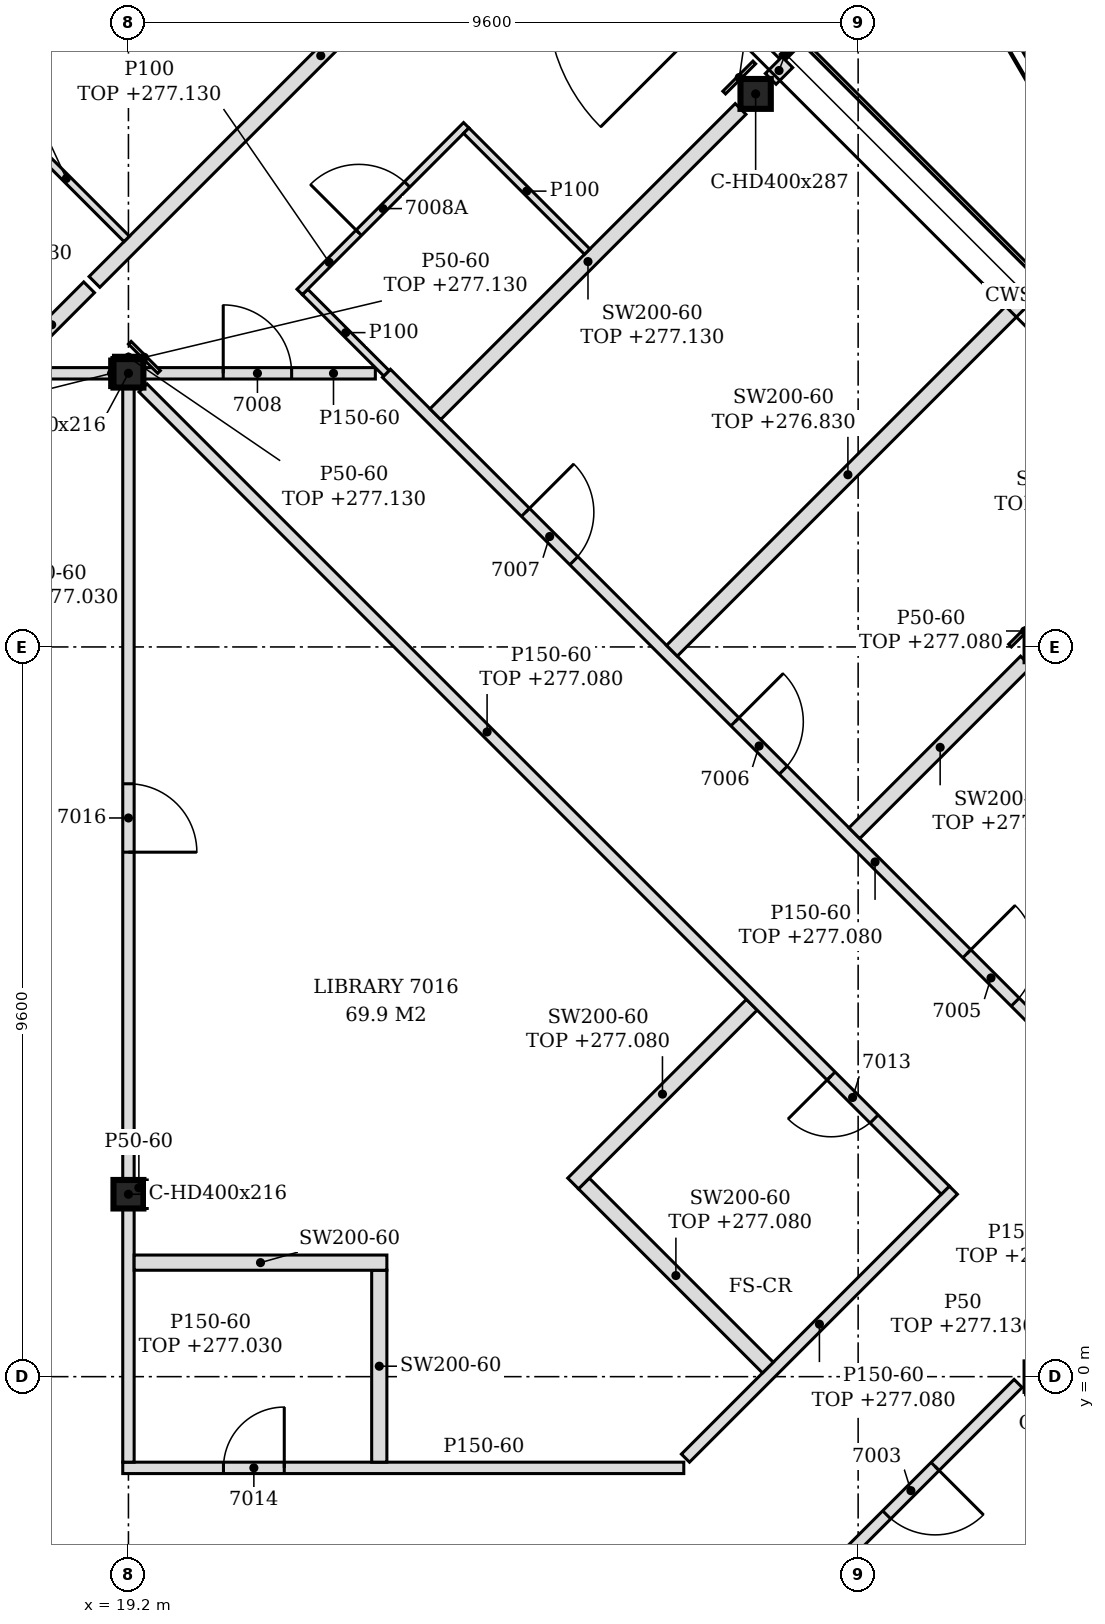
"""IFC4 building model, lengths in metres.
Left out: names, types, materials, properties, quantities, classifications, styles, units other than length and angle.
Written with IfcOpenShell. Run it as: python <this file> out.ifc"""

import sys

from ifc_helpers import new_model, si_unit, direction, frame, frame_2d, origin, origin_2d, place, context, subcontext, project, spatial, polyline, rectangle, i_section, outline, extrude, element, fill, save


model = new_model("IFC4")
c1 = context("Model", 3, precision=1e-05, world=origin(), true_north=direction((0.0, 1.0)))
c2 = subcontext(c1, "Body", "Model", "MODEL_VIEW")
j1 = project(units=[si_unit("LENGTHUNIT", "METRE"), si_unit("PLANEANGLEUNIT", "RADIAN")], contexts=[c1])
p1 = place(None, origin())
s1 = spatial("IfcSite", under=j1, at=p1, CompositionType="ELEMENT")
p2 = place(p1, origin())
s2 = spatial("IfcBuilding", under=s1, at=p2, CompositionType="ELEMENT")
p3 = place(p2, frame((0.0, 0.0, 274.2)))
s3 = spatial("IfcBuildingStorey", under=s2, at=p3, CompositionType="ELEMENT", Elevation=274.2)
p4 = place(p3, frame((27.451, 16.876, -0.15), z_axis=(0.0, 0.0, 1.0), x_axis=(1.0, 0.0, 0.0)))
e1 = element("IfcColumn", 1, at=p4, inside=s3, PredefinedType="COLUMN", context=c2, shape_type="SweptSolid", body=[
    extrude(i_section(OverallWidth=0.399, OverallDepth=0.393, WebThickness=0.023, FlangeThickness=0.037, FilletRadius=0.015, at=origin_2d()), origin(), (0.0, 0.0, 1.0), 3.6),
])
for number, where, z_axis, x_axis in (
    (2, (19.2, 2.4, -0.15), (0.0, 0.0, 1.0), (1.0, 0.0, 0.0)),
    (3, (19.2, 13.2, -0.15), (0.0, 0.0, 1.0), (1.0, 0.0, 0.0)),
):
    element("IfcColumn", number, at=place(p3, frame(where, z_axis=z_axis, x_axis=x_axis)), inside=s3, PredefinedType="COLUMN", context=c2, shape_type="SweptSolid", body=[
        extrude(i_section(OverallWidth=0.394, OverallDepth=0.375, WebThickness=0.017, FlangeThickness=0.028, FilletRadius=0.015, at=origin_2d()), origin(), (0.0, 0.0, 1.0), 3.6),
    ])
p5 = place(p3, frame((27.826, 17.42, 0.0), z_axis=(0.0, 0.0, 1.0), x_axis=(-0.707079231393, 0.707134329907, 0.0)))
e4 = element("IfcWall", 4, at=p5, inside=s3, PredefinedType="NOTDEFINED", context=c2, shape_type="SweptSolid", body=[
    extrude(rectangle(XDim=4.431, YDim=0.2, at=frame_2d((2.215, 0.0))), origin(), (0.0, 0.0, 1.0), 3.45),
])
p6 = place(p5, frame((1.015, 0.0, 0.0)))
e5 = element("IfcOpeningElement", 5, at=p6, cuts=e4, PredefinedType="OPENING", context=c2, shape_type="SweptSolid", body=[
    extrude(rectangle(XDim=2.4, YDim=2.4, at=frame_2d((1.2, 1.2))), frame((0.0, 0.11, 0.0), z_axis=(0.0, -1.0, 0.0), x_axis=(1.0, 0.0, 0.0)), (0.0, 0.0, 1.0), 0.22),
])
p7 = place(p3, frame((13.122, -17.872, 0.0), z_axis=(0.0, 0.0, 1.0), x_axis=(0.707101927234, 0.707111635106, 0.0)))
e6 = element("IfcWall", 6, at=p7, inside=s3, PredefinedType="PARTITIONING", context=c2, shape_type="SweptSolid", body=[
    extrude(rectangle(XDim=25.149, YDim=0.15, at=frame_2d((12.574, 0.0))), origin(), (0.0, 0.0, 1.0), 2.73),
])
p8 = place(p7, frame((4.672, 0.0, 0.0)))
e7 = element("IfcOpeningElement", 7, at=p8, cuts=e6, PredefinedType="OPENING", context=c2, shape_type="SweptSolid", body=[
    extrude(rectangle(XDim=0.9, YDim=2.1, at=frame_2d((0.45, 1.05))), frame((0.0, 0.085, 0.0), z_axis=(0.0, -1.0, 0.0), x_axis=(1.0, 0.0, 0.0)), (0.0, 0.0, 1.0), 0.17),
])
p9 = place(p7, frame((14.284, 0.0, 0.0)))
e8 = element("IfcOpeningElement", 8, at=p9, cuts=e6, PredefinedType="OPENING", context=c2, shape_type="SweptSolid", body=[
    extrude(rectangle(XDim=0.9, YDim=2.1, at=frame_2d((0.45, 1.05))), frame((0.0, 0.085, 0.0), z_axis=(0.0, -1.0, 0.0), x_axis=(1.0, 0.0, 0.0)), (0.0, 0.0, 1.0), 0.17),
])
p10 = place(p7, frame((22.704, 0.0, 0.0)))
e9 = element("IfcOpeningElement", 9, at=p10, cuts=e6, PredefinedType="OPENING", context=c2, shape_type="SweptSolid", body=[
    extrude(rectangle(XDim=0.9, YDim=2.1, at=frame_2d((0.45, 1.05))), frame((0.0, 0.085, 0.0), z_axis=(0.0, -1.0, 0.0), x_axis=(1.0, 0.0, 0.0)), (0.0, 0.0, 1.0), 0.17),
])
p11 = place(p3, frame((19.125, -1.2, 0.0), z_axis=(0.0, 0.0, 1.0), x_axis=(1.0, 0.0, 0.0)))
e10 = element("IfcWall", 10, at=p11, inside=s3, PredefinedType="PARTITIONING", context=c2, shape_type="SweptSolid", body=[
    extrude(outline(polyline([(0.0, 0.0), (7.381, 0.0), (7.381, 3.45), (0.225, 3.45), (0.223, 2.83), (0.0, 2.83), (0.0, 0.0)])), frame((0.0, 0.075, 0.0), z_axis=(0.0, -1.0, 0.0), x_axis=(1.0, 0.0, 0.0)), (0.0, 0.0, 1.0), 0.15),
])
p12 = place(p11, frame((1.325, 0.0, 0.0)))
e11 = element("IfcOpeningElement", 11, at=p12, cuts=e10, PredefinedType="OPENING", context=c2, shape_type="SweptSolid", body=[
    extrude(rectangle(XDim=0.8, YDim=2.1, at=frame_2d((0.4, 1.05))), frame((0.0, 0.085, 0.0), z_axis=(0.0, -1.0, 0.0), x_axis=(1.0, 0.0, 0.0)), (0.0, 0.0, 1.0), 0.17),
])
p13 = place(p3, frame((19.2, -1.125, 0.0), z_axis=(0.0, 0.0, 1.0), x_axis=(0.0, 1.0, 0.0)))
e12 = element("IfcWall", 12, at=p13, inside=s3, PredefinedType="PARTITIONING", context=c2, shape_type="SweptSolid", body=[
    extrude(rectangle(XDim=3.337, YDim=0.15, at=frame_2d((1.669, 0.0))), origin(), (0.0, 0.0, 1.0), 2.83),
])
p14 = place(p3, frame((22.5, -1.125, 0.0), z_axis=(0.0, 0.0, 1.0), x_axis=(0.0, 1.0, 0.0)))
e13 = element("IfcWall", 13, at=p14, inside=s3, PredefinedType="PARTITIONING", context=c2, shape_type="SweptSolid", body=[
    extrude(outline(polyline([(0.0, 0.0), (2.525, 0.0), (2.525, 3.45), (1.23, 3.45), (1.228, 2.88), (1.02, 2.88), (1.018, 3.45), (0.0, 3.45), (0.0, 0.0)])), frame((0.0, 0.1, 0.0), z_axis=(0.0, -1.0, 0.0), x_axis=(1.0, 0.0, 0.0)), (0.0, 0.0, 1.0), 0.2),
])
p15 = place(p3, frame((26.528, -1.072, 0.0), z_axis=(0.0, 0.0, 1.0), x_axis=(0.707106781187, 0.707106781187, 0.0)))
e14 = element("IfcWall", 14, at=p15, inside=s3, PredefinedType="PARTITIONING", context=c2, shape_type="SweptSolid", body=[
    extrude(rectangle(XDim=4.985, YDim=0.15, at=frame_2d((2.492, 0.0))), origin(), (0.0, 0.0, 1.0), 2.88),
])
p16 = place(p3, frame((27.613, 0.119, 0.0), z_axis=(0.0, 0.0, 1.0), x_axis=(-0.706999846325, 0.707213699878, 0.0)))
e15 = element("IfcWall", 15, at=p16, inside=s3, PredefinedType="PARTITIONING", context=c2, shape_type="SweptSolid", body=[
    extrude(rectangle(XDim=3.425, YDim=0.2, at=frame_2d((1.712, 0.0))), origin(), (0.0, 0.0, 1.0), 2.88),
])
p17 = place(p3, frame((19.275, 1.5, 0.0), z_axis=(0.0, 0.0, 1.0), x_axis=(1.0, 0.0, 0.0)))
e16 = element("IfcWall", 16, at=p17, inside=s3, PredefinedType="PARTITIONING", context=c2, shape_type="SweptSolid", body=[
    extrude(outline(polyline([(0.0, 0.0), (3.325, 0.0), (3.325, 3.45), (0.075, 3.45), (0.073, 2.83), (0.0, 2.83), (0.0, 0.0)])), frame((0.0, 0.1, 0.0), z_axis=(0.0, -1.0, 0.0), x_axis=(1.0, 0.0, 0.0)), (0.0, 0.0, 1.0), 0.2),
])
p18 = place(p3, frame((25.05, 2.541, 0.0), z_axis=(0.0, 0.0, 1.0), x_axis=(0.706959910949, 0.707253620925, 0.0)))
e17 = element("IfcWall", 17, at=p18, inside=s3, PredefinedType="PARTITIONING", context=c2, shape_type="SweptSolid", body=[
    extrude(rectangle(XDim=3.325, YDim=0.2, at=frame_2d((1.663, 0.0))), origin(), (0.0, 0.0, 1.0), 2.88),
])
p19 = place(p3, frame((29.947, 2.453, 0.0), z_axis=(0.0, 0.0, 1.0), x_axis=(-0.707098603185, 0.707114959093, 0.0)))
e18 = element("IfcWall", 18, at=p19, inside=s3, PredefinedType="PARTITIONING", context=c2, shape_type="SweptSolid", body=[
    extrude(rectangle(XDim=14.927, YDim=0.15, at=frame_2d((7.463, 0.0))), origin(), (0.0, 0.0, 1.0), 2.88),
])
p20 = place(p19, frame((1.325, 0.0, 0.0)))
e19 = element("IfcOpeningElement", 19, at=p20, cuts=e18, PredefinedType="OPENING", context=c2, shape_type="SweptSolid", body=[
    extrude(rectangle(XDim=0.8, YDim=2.1, at=frame_2d((0.4, 1.05))), frame((0.0, 0.085, 0.0), z_axis=(0.0, -1.0, 0.0), x_axis=(1.0, 0.0, 0.0)), (0.0, 0.0, 1.0), 0.17),
])
p21 = place(p3, frame((19.2, 2.587, 0.0), z_axis=(0.0, 0.0, 1.0), x_axis=(0.0, 1.0, 0.0)))
e20 = element("IfcWall", 20, at=p21, inside=s3, PredefinedType="PARTITIONING", context=c2, shape_type="SweptSolid", body=[
    extrude(rectangle(XDim=10.425, YDim=0.15, at=frame_2d((5.212, 0.0))), origin(), (0.0, 0.0, 1.0), 2.83),
])
p22 = place(p21, frame((4.312, 0.0, 0.0)))
e21 = element("IfcOpeningElement", 21, at=p22, cuts=e20, PredefinedType="OPENING", context=c2, shape_type="SweptSolid", body=[
    extrude(rectangle(XDim=0.9, YDim=2.1, at=frame_2d((0.45, 1.05))), frame((0.0, 0.085, 0.0), z_axis=(0.0, -1.0, 0.0), x_axis=(1.0, 0.0, 0.0)), (0.0, 0.0, 1.0), 0.17),
])
p23 = place(p3, frame((32.272, 3.522, 0.0), z_axis=(0.0, 0.0, 1.0), x_axis=(-0.707106781187, 0.707106781187, 0.0)))
e22 = element("IfcWall", 22, at=p23, inside=s3, PredefinedType="PARTITIONING", context=c2, shape_type="SweptSolid", body=[
    extrude(rectangle(XDim=13.687, YDim=0.15, at=frame_2d((6.843, 0.0))), origin(), (0.0, 0.0, 1.0), 2.88),
])
p24 = place(p23, frame((1.988, 0.0, 0.0)))
e23 = element("IfcOpeningElement", 23, at=p24, cuts=e22, PredefinedType="OPENING", context=c2, shape_type="SweptSolid", body=[
    extrude(rectangle(XDim=0.9, YDim=2.1, at=frame_2d((0.45, 1.05))), frame((0.0, 0.085, 0.0), z_axis=(0.0, -1.0, 0.0), x_axis=(1.0, 0.0, 0.0)), (0.0, 0.0, 1.0), 0.17),
])
p25 = place(p23, frame((6.303, 0.0, 0.0)))
e24 = element("IfcOpeningElement", 24, at=p25, cuts=e22, PredefinedType="OPENING", context=c2, shape_type="SweptSolid", body=[
    extrude(rectangle(XDim=0.9, YDim=2.1, at=frame_2d((0.45, 1.05))), frame((0.0, 0.085, 0.0), z_axis=(0.0, -1.0, 0.0), x_axis=(1.0, 0.0, 0.0)), (0.0, 0.0, 1.0), 0.17),
])
p26 = place(p23, frame((10.2, 0.0, 0.0)))
e25 = element("IfcOpeningElement", 25, at=p26, cuts=e22, PredefinedType="OPENING", context=c2, shape_type="SweptSolid", body=[
    extrude(rectangle(XDim=0.9, YDim=2.1, at=frame_2d((0.45, 1.05))), frame((0.0, 0.085, 0.0), z_axis=(0.0, -1.0, 0.0), x_axis=(1.0, 0.0, 0.0)), (0.0, 0.0, 1.0), 0.17),
])
p27 = place(p3, frame((28.75, 7.15, 0.0), z_axis=(0.0, 0.0, 1.0), x_axis=(0.707106781187, 0.707106781187, 0.0)))
e26 = element("IfcWall", 26, at=p27, inside=s3, PredefinedType="PARTITIONING", context=c2, shape_type="SweptSolid", body=[
    extrude(rectangle(XDim=3.193, YDim=0.2, at=frame_2d((1.597, 0.0))), origin(), (0.0, 0.0, 1.0), 2.93),
])
p28 = place(p3, frame((26.35, 9.55, 0.0), z_axis=(0.0, 0.0, 1.0), x_axis=(0.707088140984, 0.707125420898, 0.0)))
e27 = element("IfcWall", 27, at=p28, inside=s3, PredefinedType="PARTITIONING", context=c2, shape_type="SweptSolid", body=[
    extrude(rectangle(XDim=6.549, YDim=0.2, at=frame_2d((3.274, 0.0))), origin(), (0.0, 0.0, 1.0), 2.63),
])
p29 = place(p3, frame((23.238, 12.662, 0.0), z_axis=(0.0, 0.0, 1.0), x_axis=(0.707128276734, 0.707085284986, 0.0)))
e28 = element("IfcWall", 28, at=p29, inside=s3, PredefinedType="PARTITIONING", context=c2, shape_type="SweptSolid", body=[
    extrude(rectangle(XDim=5.679, YDim=0.2, at=frame_2d((2.839, 0.0))), origin(), (0.0, 0.0, 1.0), 2.93),
])
p30 = place(p3, frame((7.397, 13.2, 0.0), z_axis=(0.0, 0.0, 1.0), x_axis=(1.0, 0.0, 0.0)))
e29 = element("IfcWall", 29, at=p30, inside=s3, PredefinedType="PARTITIONING", context=c2, shape_type="SweptSolid", body=[
    extrude(rectangle(XDim=11.606, YDim=0.15, at=frame_2d((5.803, 0.0))), origin(), (0.0, 0.0, 1.0), 2.83),
])
p31 = place(p30, frame((8.129, 0.0, 0.0)))
e30 = element("IfcOpeningElement", 30, at=p31, cuts=e29, PredefinedType="OPENING", context=c2, shape_type="SweptSolid", body=[
    extrude(rectangle(XDim=0.9, YDim=2.1, at=frame_2d((0.45, 1.05))), frame((0.0, 0.085, 0.0), z_axis=(0.0, -1.0, 0.0), x_axis=(1.0, 0.0, 0.0)), (0.0, 0.0, 1.0), 0.17),
])
p32 = place(p3, frame((19.397, 13.2, 0.0), z_axis=(0.0, 0.0, 1.0), x_axis=(1.0, 0.0, 0.0)))
e31 = element("IfcWall", 31, at=p32, inside=s3, PredefinedType="PARTITIONING", context=c2, shape_type="SweptSolid", body=[
    extrude(rectangle(XDim=3.051, YDim=0.15, at=frame_2d((1.526, 0.0))), origin(), (0.0, 0.0, 1.0), 3.45),
])
p33 = place(p32, frame((1.05, 0.0, 0.0)))
e32 = element("IfcOpeningElement", 32, at=p33, cuts=e31, PredefinedType="OPENING", context=c2, shape_type="SweptSolid", body=[
    extrude(rectangle(XDim=0.9, YDim=2.1, at=frame_2d((0.45, 1.05))), frame((0.0, 0.085, 0.0), z_axis=(0.0, -1.0, 0.0), x_axis=(1.0, 0.0, 0.0)), (0.0, 0.0, 1.0), 0.17),
])
p34 = place(p3, frame((22.594, 13.2, 0.0), z_axis=(0.0, 0.0, 1.0), x_axis=(-0.707106781187, 0.707106781187, 0.0)))
e33 = element("IfcWall", 33, at=p34, inside=s3, PredefinedType="PARTITIONING", context=c2, shape_type="SweptSolid", body=[
    extrude(rectangle(XDim=1.514, YDim=0.1, at=frame_2d((0.757, 0.0))), origin(), (0.0, 0.0, 1.0), 3.45),
])
p35 = place(p3, frame((17.698, 13.346, 0.0), z_axis=(0.0, 0.0, 1.0), x_axis=(0.707019164958, 0.70719438656, 0.0)))
e34 = element("IfcWall", 34, at=p35, inside=s3, PredefinedType="PARTITIONING", context=c2, shape_type="SweptSolid", body=[
    extrude(rectangle(XDim=1.393, YDim=0.2, at=frame_2d((0.697, 0.0))), origin(), (0.0, 0.0, 1.0), 2.83),
])
p36 = place(p3, frame((21.453, 14.271, 0.0), z_axis=(0.0, 0.0, 1.0), x_axis=(0.70690988682, 0.707303620743, 0.0)))
e35 = element("IfcWall", 35, at=p36, inside=s3, PredefinedType="PARTITIONING", context=c2, shape_type="SweptSolid", body=[
    extrude(rectangle(XDim=3.1, YDim=0.1, at=frame_2d((1.55, 0.0))), origin(), (0.0, 0.0, 1.0), 2.93),
])
p37 = place(p36, frame((1.1, 0.0, 0.0)))
e36 = element("IfcOpeningElement", 36, at=p37, cuts=e35, PredefinedType="OPENING", context=c2, shape_type="SweptSolid", body=[
    extrude(rectangle(XDim=0.9, YDim=2.1, at=frame_2d((0.45, 1.05))), frame((0.0, 0.06, 0.0), z_axis=(0.0, -1.0, 0.0), x_axis=(1.0, 0.0, 0.0)), (0.0, 0.0, 1.0), 0.12),
])
p38 = place(p3, frame((18.753, 14.402, 0.0), z_axis=(0.0, 0.0, 1.0), x_axis=(0.707179267043, 0.707034287899, 0.0)))
e37 = element("IfcWall", 37, at=p38, inside=s3, PredefinedType="PARTITIONING", context=c2, shape_type="SweptSolid", body=[
    extrude(rectangle(XDim=8.42, YDim=0.2, at=frame_2d((4.21, 0.0))), origin(), (0.0, 0.0, 1.0), 2.93),
])
p39 = place(p3, frame((25.235, 14.801, 0.0), z_axis=(0.0, 0.0, 1.0), x_axis=(-0.706944047094, 0.707269477836, 0.0)))
e38 = element("IfcWall", 38, at=p39, inside=s3, PredefinedType="PARTITIONING", context=c2, shape_type="SweptSolid", body=[
    extrude(rectangle(XDim=2.251, YDim=0.1, at=frame_2d((1.125, 0.0))), origin(), (0.0, 0.0, 1.0), 3.45),
])
p40 = place(p3, frame((19.177, 14.968, 0.0), z_axis=(0.0, 0.0, 1.0), x_axis=(-0.706889644159, 0.707323851557, 0.0)))
e39 = element("IfcWall", 39, at=p40, inside=s3, PredefinedType="PARTITIONING", context=c2, shape_type="SweptSolid", body=[
    extrude(rectangle(XDim=2.249, YDim=0.1, at=frame_2d((1.125, 0.0))), origin(), (0.0, 0.0, 1.0), 2.93),
])
p41 = place(p3, frame((27.65, 17.073, 0.0), z_axis=(0.0, 0.0, 1.0), x_axis=(0.707106781187, 0.707106781187, 0.0)))
e40 = element("IfcWall", 40, at=p41, inside=s3, PredefinedType="PARTITIONING", context=c2, shape_type="SweptSolid", body=[
    extrude(rectangle(XDim=0.31, YDim=0.2, at=frame_2d((0.155, 0.0))), origin(), (0.0, 0.0, 1.0), 3.45),
])
p42 = place(p3, frame((19.422, 2.212, 0.0), z_axis=(0.0, 0.0, 1.0), x_axis=(0.0, 1.0, 0.0)))
e41 = element("IfcWall", 41, at=p42, inside=s3, PredefinedType="PARTITIONING", context=c2, shape_type="SweptSolid", body=[
    extrude(rectangle(XDim=0.375, YDim=0.05, at=frame_2d((0.188, 0.0))), origin(), (0.0, 0.0, 1.0), 3.45),
])
p43 = place(p3, frame((18.978, 13.012, 0.0), z_axis=(0.0, 0.0, 1.0), x_axis=(0.0, 1.0, 0.0)))
e42 = element("IfcWall", 42, at=p43, inside=s3, PredefinedType="PARTITIONING", context=c2, shape_type="SweptSolid", body=[
    extrude(rectangle(XDim=0.375, YDim=0.05, at=frame_2d((0.188, 0.0))), origin(), (0.0, 0.0, 1.0), 2.83),
])
p44 = place(p3, frame((19.602, 13.218, 0.0), z_axis=(0.0, 0.0, 1.0), x_axis=(-0.707106781187, 0.707106781187, 0.0)))
e43 = element("IfcWall", 43, at=p44, inside=s3, PredefinedType="PARTITIONING", context=c2, shape_type="SweptSolid", body=[
    extrude(rectangle(XDim=0.544, YDim=0.05, at=frame_2d((0.272, 0.0))), origin(), (0.0, 0.0, 1.0), 2.93),
])
p45 = place(p3, frame((30.798, 9.618, 0.0), z_axis=(0.0, 0.0, 1.0), x_axis=(0.707106781187, 0.707106781187, 0.0)))
e44 = element("IfcWall", 44, at=p45, inside=s3, PredefinedType="PARTITIONING", context=c2, shape_type="SweptSolid", body=[
    extrude(rectangle(XDim=0.544, YDim=0.05, at=frame_2d((0.272, 0.0))), origin(), (0.0, 0.0, 1.0), 2.88),
])
p46 = place(p3, frame((27.038, 16.893, 0.0), z_axis=(0.0, 0.0, 1.0), x_axis=(0.707106781187, 0.707106781187, 0.0)))
e45 = element("IfcWall", 45, at=p46, inside=s3, PredefinedType="PARTITIONING", context=c2, shape_type="SweptSolid", body=[
    extrude(rectangle(XDim=0.56, YDim=0.05, at=frame_2d((0.28, 0.0))), origin(), (0.0, 0.0, 1.0), 2.93),
])
p47 = place(p3, frame((19.003, 13.413, 0.0), z_axis=(0.0, 0.0, 1.0), x_axis=(1.0, 0.0, 0.0)))
e46 = element("IfcWall", 46, at=p47, inside=s3, PredefinedType="PARTITIONING", context=c2, shape_type="SweptSolid", body=[
    extrude(rectangle(XDim=0.394, YDim=0.05, at=frame_2d((0.197, 0.0))), origin(), (0.0, 0.0, 1.0), 2.93),
])
p48 = place(p10, frame((0.9, 0.0, 0.0), z_axis=(0.0, 0.0, 1.0), x_axis=(-1.0, 0.0, 0.0)))
e47 = element("IfcDoor", 47, at=p48, inside=s3, OperationType="SINGLE_SWING_LEFT", PredefinedType="DOOR", context=c2, shape_type="SweptSolid", body=[
    extrude(rectangle(XDim=0.9, YDim=2.1, at=frame_2d((0.45, 1.05))), frame((0.0, 0.025, 0.0), z_axis=(0.0, -1.0, 0.0), x_axis=(1.0, 0.0, 0.0)), (0.0, 0.0, 1.0), 0.05),
])
fill(e9, e47)
p49 = place(p24, frame((0.9, 0.0, 0.0), z_axis=(0.0, 0.0, 1.0), x_axis=(-1.0, 0.0, 0.0)))
e48 = element("IfcDoor", 48, at=p49, inside=s3, OperationType="SINGLE_SWING_LEFT", PredefinedType="DOOR", context=c2, shape_type="SweptSolid", body=[
    extrude(rectangle(XDim=0.9, YDim=2.1, at=frame_2d((0.45, 1.05))), frame((0.0, 0.025, 0.0), z_axis=(0.0, -1.0, 0.0), x_axis=(1.0, 0.0, 0.0)), (0.0, 0.0, 1.0), 0.05),
])
fill(e23, e48)
p50 = place(p25, frame((0.9, 0.0, 0.0), z_axis=(0.0, 0.0, 1.0), x_axis=(-1.0, 0.0, 0.0)))
e49 = element("IfcDoor", 49, at=p50, inside=s3, OperationType="SINGLE_SWING_LEFT", PredefinedType="DOOR", context=c2, shape_type="SweptSolid", body=[
    extrude(rectangle(XDim=0.9, YDim=2.1, at=frame_2d((0.45, 1.05))), frame((0.0, 0.025, 0.0), z_axis=(0.0, -1.0, 0.0), x_axis=(1.0, 0.0, 0.0)), (0.0, 0.0, 1.0), 0.05),
])
fill(e24, e49)
p51 = place(p26, frame((0.9, 0.0, 0.0), z_axis=(0.0, 0.0, 1.0), x_axis=(-1.0, 0.0, 0.0)))
e50 = element("IfcDoor", 50, at=p51, inside=s3, OperationType="SINGLE_SWING_LEFT", PredefinedType="DOOR", context=c2, shape_type="SweptSolid", body=[
    extrude(rectangle(XDim=0.9, YDim=2.1, at=frame_2d((0.45, 1.05))), frame((0.0, 0.025, 0.0), z_axis=(0.0, -1.0, 0.0), x_axis=(1.0, 0.0, 0.0)), (0.0, 0.0, 1.0), 0.05),
])
fill(e25, e50)
p52 = place(p33, origin())
e51 = element("IfcDoor", 51, at=p52, inside=s3, OperationType="SINGLE_SWING_LEFT", PredefinedType="DOOR", context=c2, shape_type="SweptSolid", body=[
    extrude(rectangle(XDim=0.9, YDim=2.1, at=frame_2d((0.45, 1.05))), frame((0.0, 0.025, 0.0), z_axis=(0.0, -1.0, 0.0), x_axis=(1.0, 0.0, 0.0)), (0.0, 0.0, 1.0), 0.05),
])
fill(e32, e51)
p53 = place(p37, origin())
e52 = element("IfcDoor", 52, at=p53, inside=s3, OperationType="SINGLE_SWING_LEFT", PredefinedType="DOOR", context=c2, shape_type="SweptSolid", body=[
    extrude(rectangle(XDim=0.9, YDim=2.1, at=frame_2d((0.45, 1.05))), frame((0.0, 0.025, 0.0), z_axis=(0.0, -1.0, 0.0), x_axis=(1.0, 0.0, 0.0)), (0.0, 0.0, 1.0), 0.05),
])
fill(e36, e52)
p54 = place(p20, origin())
e53 = element("IfcDoor", 53, at=p54, inside=s3, OperationType="SINGLE_SWING_RIGHT", PredefinedType="DOOR", context=c2, shape_type="SweptSolid", body=[
    extrude(rectangle(XDim=0.8, YDim=2.1, at=frame_2d((0.4, 1.05))), frame((0.0, 0.025, 0.0), z_axis=(0.0, -1.0, 0.0), x_axis=(1.0, 0.0, 0.0)), (0.0, 0.0, 1.0), 0.05),
])
fill(e19, e53)
p55 = place(p12, origin())
e54 = element("IfcDoor", 54, at=p55, inside=s3, OperationType="SINGLE_SWING_RIGHT", PredefinedType="DOOR", context=c2, shape_type="SweptSolid", body=[
    extrude(rectangle(XDim=0.8, YDim=2.1, at=frame_2d((0.4, 1.05))), frame((0.0, 0.025, 0.0), z_axis=(0.0, -1.0, 0.0), x_axis=(1.0, 0.0, 0.0)), (0.0, 0.0, 1.0), 0.05),
])
fill(e11, e54)
p56 = place(p22, frame((0.9, 0.0, 0.0), z_axis=(0.0, 0.0, 1.0), x_axis=(-1.0, 0.0, 0.0)))
e55 = element("IfcDoor", 55, at=p56, inside=s3, OperationType="SINGLE_SWING_RIGHT", PredefinedType="DOOR", context=c2, shape_type="SweptSolid", body=[
    extrude(rectangle(XDim=0.9, YDim=2.1, at=frame_2d((0.45, 1.05))), frame((0.0, 0.025, 0.0), z_axis=(0.0, -1.0, 0.0), x_axis=(1.0, 0.0, 0.0)), (0.0, 0.0, 1.0), 0.05),
])
fill(e21, e55)
save(model, sys.argv[1])
